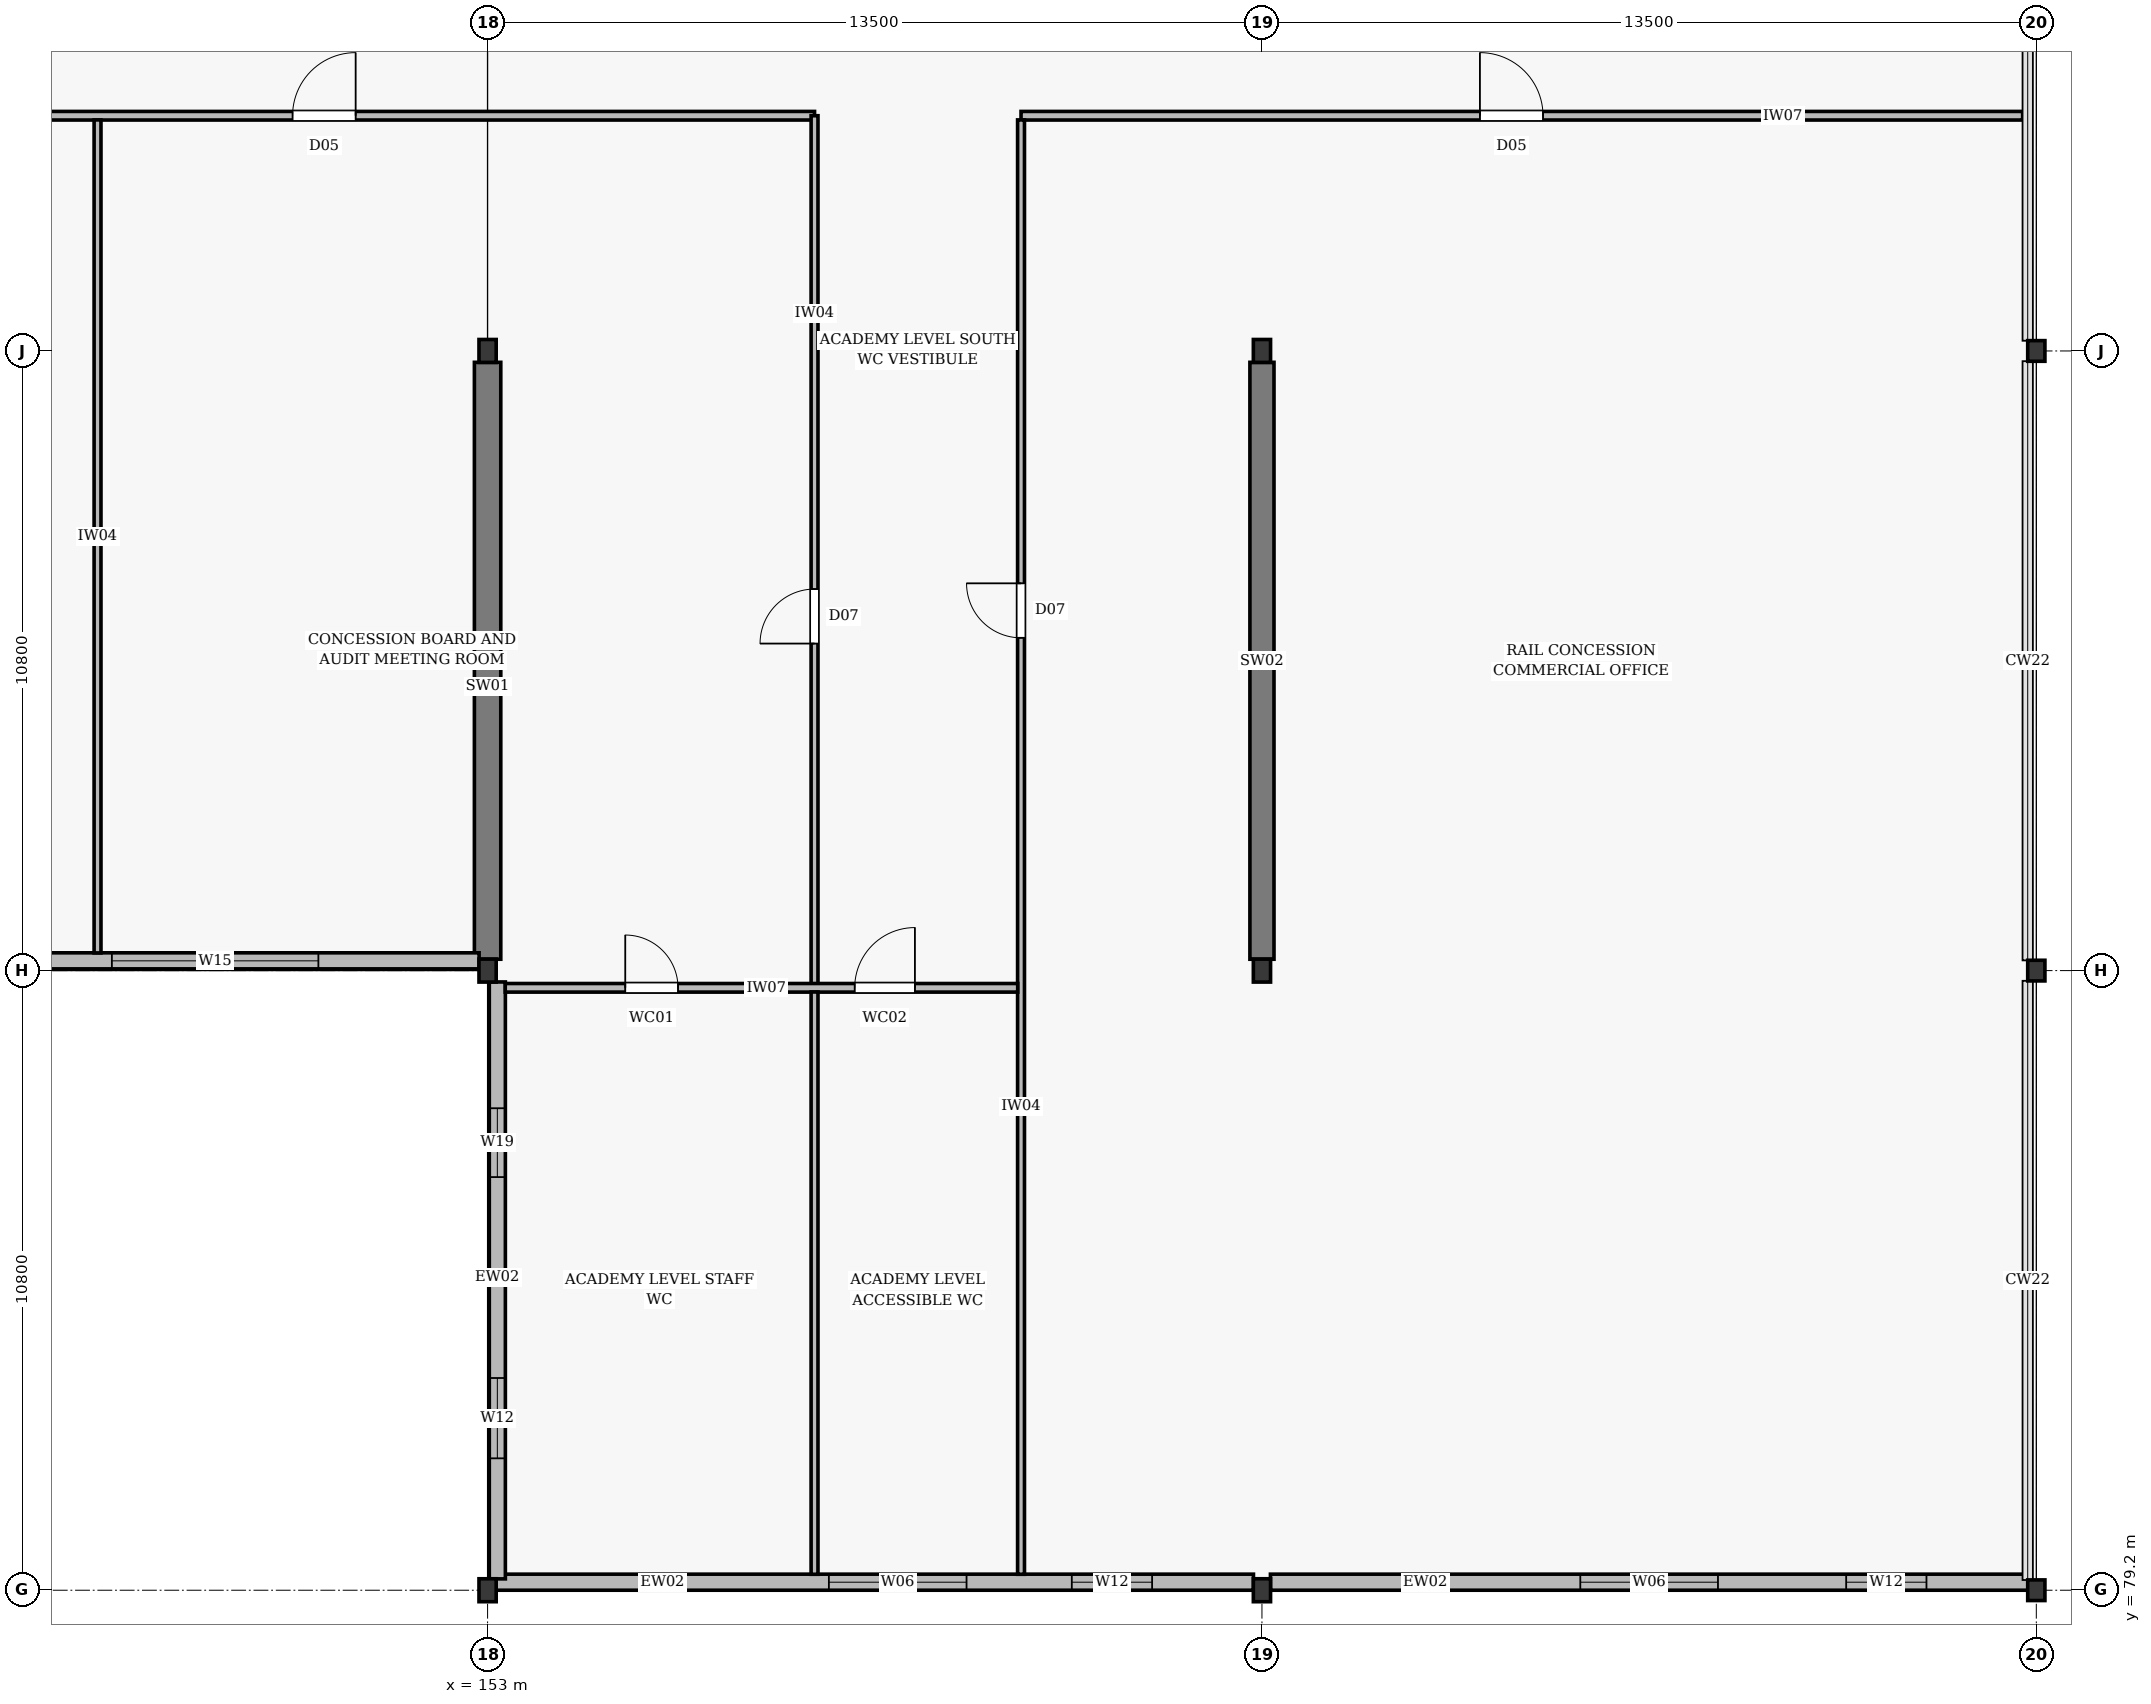
"""IFC4 building model, lengths in metres.
Left out: names, types, materials, properties, quantities, classifications, styles, units other than length and angle.
Written with IfcOpenShell. Run it as: python <this file> out.ifc"""

import sys

from ifc_helpers import new_model, si_unit, direction, frame, frame_2d, origin, origin_2d, place, context, subcontext, project, spatial, rectangle, i_section, extrude, element, fill, save


model = new_model("IFC4")
c1 = context("Model", 3, precision=1e-05, world=origin(), true_north=direction((0.0, 1.0)))
c2 = subcontext(c1, "Body", "Model", "MODEL_VIEW")
j1 = project(units=[si_unit("LENGTHUNIT", "METRE"), si_unit("PLANEANGLEUNIT", "RADIAN")], contexts=[c1])
p1 = place(None, origin())
s1 = spatial("IfcSite", under=j1, at=p1, CompositionType="ELEMENT")
p2 = place(p1, origin())
s2 = spatial("IfcBuilding", under=s1, at=p2, CompositionType="ELEMENT")
p3 = place(p2, frame((0.0, 0.0, 21.3)))
s3 = spatial("IfcBuildingStorey", under=s2, at=p3, CompositionType="ELEMENT", Elevation=21.3)
for number, where, z_axis, x_axis in (
    (1, (153.0, 79.2, 0.0), (0.0, 0.0, 1.0), (1.0, 0.0, 0.0)),
    (2, (153.0, 90.0, 0.0), (0.0, 0.0, 1.0), (1.0, 0.0, 0.0)),
    (3, (153.0, 100.8, 0.0), (0.0, 0.0, 1.0), (1.0, 0.0, 0.0)),
    (4, (166.5, 79.2, 0.0), (0.0, 0.0, 1.0), (1.0, 0.0, 0.0)),
    (5, (166.5, 90.0, 0.0), (0.0, 0.0, 1.0), (1.0, 0.0, 0.0)),
    (6, (166.5, 100.8, 0.0), (0.0, 0.0, 1.0), (1.0, 0.0, 0.0)),
):
    element("IfcColumn", number, at=place(p3, frame(where, z_axis=z_axis, x_axis=x_axis)), inside=s3, PredefinedType="COLUMN", context=c2, shape_type="SweptSolid", body=[
        extrude(i_section(OverallWidth=0.3, OverallDepth=0.4, WebThickness=0.013, FlangeThickness=0.024, at=origin_2d()), origin(), (0.0, 0.0, 1.0), 3.9),
    ])
for number, where, z_axis, x_axis in (
    (7, (180.0, 79.2, 0.0), (0.0, 0.0, 1.0), (1.0, 0.0, 0.0)),
    (8, (180.0, 90.0, 0.0), (0.0, 0.0, 1.0), (1.0, 0.0, 0.0)),
    (9, (180.0, 100.8, 0.0), (0.0, 0.0, 1.0), (1.0, 0.0, 0.0)),
):
    element("IfcColumn", number, at=place(p3, frame(where, z_axis=z_axis, x_axis=x_axis)), inside=s3, PredefinedType="COLUMN", context=c2, shape_type="SweptSolid", body=[
        extrude(i_section(OverallWidth=0.3, OverallDepth=0.36, WebThickness=0.012, FlangeThickness=0.022, at=origin_2d()), origin(), (0.0, 0.0, 1.0), 3.9),
    ])
p4 = place(p3, frame((153.0, 90.198, 0.0), z_axis=(0.0, 0.0, 1.0), x_axis=(0.0, 1.0, 0.0)))
e10 = element("IfcWall", 10, at=p4, inside=s3, PredefinedType="SHEAR", context=c2, shape_type="SweptSolid", body=[
    extrude(rectangle(XDim=10.404, YDim=0.46, at=frame_2d((5.202, 0.0))), origin(), (0.0, 0.0, 1.0), 3.68),
])
p5 = place(p3, frame((166.5, 90.198, 0.0), z_axis=(0.0, 0.0, 1.0), x_axis=(0.0, 1.0, 0.0)))
e11 = element("IfcWall", 11, at=p5, inside=s3, PredefinedType="SHEAR", context=c2, shape_type="SweptSolid", body=[
    extrude(rectangle(XDim=10.404, YDim=0.42, at=frame_2d((5.202, 0.0))), origin(), (0.0, 0.0, 1.0), 3.68),
])
p6 = place(p3, frame((153.148, 79.34, 0.0), z_axis=(0.0, 0.0, 1.0), x_axis=(1.0, 0.0, 0.0)))
e12 = element("IfcWall", 12, at=p6, inside=s3, PredefinedType="STANDARD", context=c2, shape_type="SweptSolid", body=[
    extrude(rectangle(XDim=13.204, YDim=0.28, at=frame_2d((6.602, 0.0))), origin(), (0.0, 0.0, 1.0), 3.12),
])
p7 = place(p6, frame((5.802, 0.0, 0.48)))
e13 = element("IfcOpeningElement", 13, at=p7, cuts=e12, PredefinedType="OPENING", context=c2, shape_type="SweptSolid", body=[
    extrude(rectangle(XDim=2.4, YDim=2.4, at=frame_2d((1.2, 1.2))), frame((0.0, 0.152, 0.0), z_axis=(0.0, -1.0, 0.0), x_axis=(1.0, 0.0, 0.0)), (0.0, 0.0, 1.0), 0.304),
])
p8 = place(p6, frame((10.037, 0.0, 1.05)))
e14 = element("IfcOpeningElement", 14, at=p8, cuts=e12, PredefinedType="OPENING", context=c2, shape_type="SweptSolid", body=[
    extrude(rectangle(XDim=1.4, YDim=1.8, at=frame_2d((0.7, 0.9))), frame((0.0, 0.152, 0.0), z_axis=(0.0, -1.0, 0.0), x_axis=(1.0, 0.0, 0.0)), (0.0, 0.0, 1.0), 0.304),
])
p9 = place(p3, frame((166.648, 79.34, 0.0), z_axis=(0.0, 0.0, 1.0), x_axis=(1.0, 0.0, 0.0)))
e15 = element("IfcWall", 15, at=p9, inside=s3, PredefinedType="STANDARD", context=c2, shape_type="SweptSolid", body=[
    extrude(rectangle(XDim=13.204, YDim=0.28, at=frame_2d((6.602, 0.0))), origin(), (0.0, 0.0, 1.0), 3.12),
])
p10 = place(p9, frame((5.402, 0.0, 0.48)))
e16 = element("IfcOpeningElement", 16, at=p10, cuts=e15, PredefinedType="OPENING", context=c2, shape_type="SweptSolid", body=[
    extrude(rectangle(XDim=2.4, YDim=2.4, at=frame_2d((1.2, 1.2))), frame((0.0, 0.152, 0.0), z_axis=(0.0, -1.0, 0.0), x_axis=(1.0, 0.0, 0.0)), (0.0, 0.0, 1.0), 0.304),
])
p11 = place(p9, frame((10.037, 0.0, 1.05)))
e17 = element("IfcOpeningElement", 17, at=p11, cuts=e15, PredefinedType="OPENING", context=c2, shape_type="SweptSolid", body=[
    extrude(rectangle(XDim=1.4, YDim=1.8, at=frame_2d((0.7, 0.9))), frame((0.0, 0.152, 0.0), z_axis=(0.0, -1.0, 0.0), x_axis=(1.0, 0.0, 0.0)), (0.0, 0.0, 1.0), 0.304),
])
p12 = place(p3, frame((140.148, 90.17, 0.0), z_axis=(0.0, 0.0, 1.0), x_axis=(1.0, 0.0, 0.0)))
e18 = element("IfcWall", 18, at=p12, inside=s3, PredefinedType="STANDARD", context=c2, shape_type="SweptSolid", body=[
    extrude(rectangle(XDim=12.704, YDim=0.28, at=frame_2d((6.352, 0.0))), origin(), (0.0, 0.0, 1.0), 3.12),
])
p13 = place(p12, frame((6.302, 0.0, 1.05)))
e19 = element("IfcOpeningElement", 19, at=p13, cuts=e18, PredefinedType="OPENING", context=c2, shape_type="SweptSolid", body=[
    extrude(rectangle(XDim=3.6, YDim=1.4, at=frame_2d((1.8, 0.7))), frame((0.0, 0.152, 0.0), z_axis=(0.0, -1.0, 0.0), x_axis=(1.0, 0.0, 0.0)), (0.0, 0.0, 1.0), 0.304),
])
p14 = place(p3, frame((153.17, 79.398, 0.0), z_axis=(0.0, 0.0, 1.0), x_axis=(0.0, 1.0, 0.0)))
e20 = element("IfcWall", 20, at=p14, inside=s3, PredefinedType="STANDARD", context=c2, shape_type="SweptSolid", body=[
    extrude(rectangle(XDim=10.404, YDim=0.28, at=frame_2d((5.202, 0.0))), origin(), (0.0, 0.0, 1.0), 3.12),
])
p15 = place(p14, frame((2.101, 0.0, 1.05)))
e21 = element("IfcOpeningElement", 21, at=p15, cuts=e20, PredefinedType="OPENING", context=c2, shape_type="SweptSolid", body=[
    extrude(rectangle(XDim=1.4, YDim=1.8, at=frame_2d((0.7, 0.9))), frame((0.0, 0.152, 0.0), z_axis=(0.0, -1.0, 0.0), x_axis=(1.0, 0.0, 0.0)), (0.0, 0.0, 1.0), 0.304),
])
p16 = place(p14, frame((7.003, 0.0, 1.05)))
e22 = element("IfcOpeningElement", 22, at=p16, cuts=e20, PredefinedType="OPENING", context=c2, shape_type="SweptSolid", body=[
    extrude(rectangle(XDim=1.2, YDim=0.9, at=frame_2d((0.6, 0.45))), frame((0.0, 0.152, 0.0), z_axis=(0.0, -1.0, 0.0), x_axis=(1.0, 0.0, 0.0)), (0.0, 0.0, 1.0), 0.304),
])
p17 = place(p3, frame((128.288, 104.9, 0.0), z_axis=(0.0, 0.0, 1.0), x_axis=(1.0, 0.0, 0.0)))
e23 = element("IfcWall", 23, at=p17, inside=s3, PredefinedType="PARTITIONING", context=c2, shape_type="SweptSolid", body=[
    extrude(rectangle(XDim=30.412, YDim=0.15, at=frame_2d((15.206, 0.0))), origin(), (0.0, 0.0, 1.0), 3.33),
])
p18 = place(p17, frame((7.312, 0.0, 0.005)))
e24 = element("IfcOpeningElement", 24, at=p18, cuts=e23, PredefinedType="OPENING", context=c2, shape_type="SweptSolid", body=[
    extrude(rectangle(XDim=1.65, YDim=2.2, at=frame_2d((0.825, 1.1))), frame((0.0, 0.087, 0.0), z_axis=(0.0, -1.0, 0.0), x_axis=(1.0, 0.0, 0.0)), (0.0, 0.0, 1.0), 0.174),
])
p19 = place(p17, frame((21.312, 0.0, 0.005)))
e25 = element("IfcOpeningElement", 25, at=p19, cuts=e23, PredefinedType="OPENING", context=c2, shape_type="SweptSolid", body=[
    extrude(rectangle(XDim=1.1, YDim=2.1, at=frame_2d((0.55, 1.05))), frame((0.0, 0.087, 0.0), z_axis=(0.0, -1.0, 0.0), x_axis=(1.0, 0.0, 0.0)), (0.0, 0.0, 1.0), 0.174),
])
p20 = place(p3, frame((162.3, 104.9, 0.0), z_axis=(0.0, 0.0, 1.0), x_axis=(1.0, 0.0, 0.0)))
e26 = element("IfcWall", 26, at=p20, inside=s3, PredefinedType="PARTITIONING", context=c2, shape_type="SweptSolid", body=[
    extrude(rectangle(XDim=17.462, YDim=0.15, at=frame_2d((8.731, 0.0))), origin(), (0.0, 0.0, 1.0), 3.31),
])
p21 = place(p20, frame((8.0, 0.0, 0.005)))
e27 = element("IfcOpeningElement", 27, at=p21, cuts=e26, PredefinedType="OPENING", context=c2, shape_type="SweptSolid", body=[
    extrude(rectangle(XDim=1.1, YDim=2.1, at=frame_2d((0.55, 1.05))), frame((0.0, 0.087, 0.0), z_axis=(0.0, -1.0, 0.0), x_axis=(1.0, 0.0, 0.0)), (0.0, 0.0, 1.0), 0.174),
])
p22 = place(p3, frame((158.7, 89.7, 0.0), z_axis=(0.0, 0.0, 1.0), x_axis=(0.0, 1.0, 0.0)))
e28 = element("IfcWall", 28, at=p22, inside=s3, PredefinedType="PARTITIONING", context=c2, shape_type="SweptSolid", body=[
    extrude(rectangle(XDim=15.2, YDim=0.12, at=frame_2d((7.6, 0.0))), origin(), (0.0, 0.0, 1.0), 3.12),
])
p23 = place(p22, frame((6.0, 0.0, 0.005)))
e29 = element("IfcOpeningElement", 29, at=p23, cuts=e28, PredefinedType="OPENING", context=c2, shape_type="SweptSolid", body=[
    extrude(rectangle(XDim=0.95, YDim=2.1, at=frame_2d((0.475, 1.05))), frame((0.0, 0.072, 0.0), z_axis=(0.0, -1.0, 0.0), x_axis=(1.0, 0.0, 0.0)), (0.0, 0.0, 1.0), 0.144),
])
p24 = place(p3, frame((162.3, 79.478, 0.0), z_axis=(0.0, 0.0, 1.0), x_axis=(0.0, 1.0, 0.0)))
e30 = element("IfcWall", 30, at=p24, inside=s3, PredefinedType="PARTITIONING", context=c2, shape_type="SweptSolid", body=[
    extrude(rectangle(XDim=25.349, YDim=0.12, at=frame_2d((12.674, 0.0))), origin(), (0.0, 0.0, 1.0), 3.12),
])
p25 = place(p24, frame((16.322, 0.0, 0.005)))
e31 = element("IfcOpeningElement", 31, at=p25, cuts=e30, PredefinedType="OPENING", context=c2, shape_type="SweptSolid", body=[
    extrude(rectangle(XDim=0.95, YDim=2.1, at=frame_2d((0.475, 1.05))), frame((0.0, 0.072, 0.0), z_axis=(0.0, -1.0, 0.0), x_axis=(1.0, 0.0, 0.0)), (0.0, 0.0, 1.0), 0.144),
])
p26 = place(p3, frame((146.2, 90.308, 0.0), z_axis=(0.0, 0.0, 1.0), x_axis=(0.0, 1.0, 0.0)))
e32 = element("IfcWall", 32, at=p26, inside=s3, PredefinedType="PARTITIONING", context=c2, shape_type="SweptSolid", body=[
    extrude(rectangle(XDim=14.519, YDim=0.12, at=frame_2d((7.259, 0.0))), origin(), (0.0, 0.0, 1.0), 3.12),
])
p27 = place(p3, frame((153.308, 89.7, 0.0), z_axis=(0.0, 0.0, 1.0), x_axis=(1.0, 0.0, 0.0)))
e33 = element("IfcWall", 33, at=p27, inside=s3, PredefinedType="PARTITIONING", context=c2, shape_type="SweptSolid", body=[
    extrude(rectangle(XDim=8.934, YDim=0.15, at=frame_2d((4.467, 0.0))), origin(), (0.0, 0.0, 1.0), 3.12),
])
p28 = place(p27, frame((2.092, 0.0, 0.005)))
e34 = element("IfcOpeningElement", 34, at=p28, cuts=e33, PredefinedType="OPENING", context=c2, shape_type="SweptSolid", body=[
    extrude(rectangle(XDim=0.92, YDim=2.12, at=frame_2d((0.46, 1.06))), frame((0.0, 0.087, 0.0), z_axis=(0.0, -1.0, 0.0), x_axis=(1.0, 0.0, 0.0)), (0.0, 0.0, 1.0), 0.174),
])
p29 = place(p27, frame((6.092, 0.0, 0.005)))
e35 = element("IfcOpeningElement", 35, at=p29, cuts=e33, PredefinedType="OPENING", context=c2, shape_type="SweptSolid", body=[
    extrude(rectangle(XDim=1.05, YDim=2.15, at=frame_2d((0.525, 1.075))), frame((0.0, 0.087, 0.0), z_axis=(0.0, -1.0, 0.0), x_axis=(1.0, 0.0, 0.0)), (0.0, 0.0, 1.0), 0.174),
])
p30 = place(p3, frame((158.7, 79.478, 0.0), z_axis=(0.0, 0.0, 1.0), x_axis=(0.0, 1.0, 0.0)))
e36 = element("IfcWall", 36, at=p30, inside=s3, PredefinedType="PARTITIONING", context=c2, shape_type="SweptSolid", body=[
    extrude(rectangle(XDim=10.149, YDim=0.12, at=frame_2d((5.074, 0.0))), origin(), (0.0, 0.0, 1.0), 3.12),
])
p31 = place(p7, origin())
e37 = element("IfcWindow", 37, at=p31, inside=s3, PartitioningType="DOUBLE_PANEL_VERTICAL", PredefinedType="WINDOW", context=c2, shape_type="SweptSolid", body=[
    extrude(rectangle(XDim=2.4, YDim=2.4, at=frame_2d((1.2, 1.2))), frame((0.0, 0.03, 0.0), z_axis=(0.0, -1.0, 0.0), x_axis=(1.0, 0.0, 0.0)), (0.0, 0.0, 1.0), 0.06),
])
fill(e13, e37)
p32 = place(p8, origin())
e38 = element("IfcWindow", 38, at=p32, inside=s3, PartitioningType="DOUBLE_PANEL_VERTICAL", PredefinedType="WINDOW", context=c2, shape_type="SweptSolid", body=[
    extrude(rectangle(XDim=1.4, YDim=1.8, at=frame_2d((0.7, 0.9))), frame((0.0, 0.03, 0.0), z_axis=(0.0, -1.0, 0.0), x_axis=(1.0, 0.0, 0.0)), (0.0, 0.0, 1.0), 0.06),
])
fill(e14, e38)
p33 = place(p10, origin())
e39 = element("IfcWindow", 39, at=p33, inside=s3, PartitioningType="DOUBLE_PANEL_VERTICAL", PredefinedType="WINDOW", context=c2, shape_type="SweptSolid", body=[
    extrude(rectangle(XDim=2.4, YDim=2.4, at=frame_2d((1.2, 1.2))), frame((0.0, 0.03, 0.0), z_axis=(0.0, -1.0, 0.0), x_axis=(1.0, 0.0, 0.0)), (0.0, 0.0, 1.0), 0.06),
])
fill(e16, e39)
p34 = place(p11, origin())
e40 = element("IfcWindow", 40, at=p34, inside=s3, PartitioningType="DOUBLE_PANEL_VERTICAL", PredefinedType="WINDOW", context=c2, shape_type="SweptSolid", body=[
    extrude(rectangle(XDim=1.4, YDim=1.8, at=frame_2d((0.7, 0.9))), frame((0.0, 0.03, 0.0), z_axis=(0.0, -1.0, 0.0), x_axis=(1.0, 0.0, 0.0)), (0.0, 0.0, 1.0), 0.06),
])
fill(e17, e40)
p35 = place(p13, origin())
e41 = element("IfcWindow", 41, at=p35, inside=s3, PartitioningType="DOUBLE_PANEL_VERTICAL", PredefinedType="WINDOW", context=c2, shape_type="SweptSolid", body=[
    extrude(rectangle(XDim=3.6, YDim=1.4, at=frame_2d((1.8, 0.7))), frame((0.0, 0.03, 0.0), z_axis=(0.0, -1.0, 0.0), x_axis=(1.0, 0.0, 0.0)), (0.0, 0.0, 1.0), 0.06),
])
fill(e19, e41)
p36 = place(p15, origin())
e42 = element("IfcWindow", 42, at=p36, inside=s3, PartitioningType="DOUBLE_PANEL_VERTICAL", PredefinedType="WINDOW", context=c2, shape_type="SweptSolid", body=[
    extrude(rectangle(XDim=1.4, YDim=1.8, at=frame_2d((0.7, 0.9))), frame((0.0, 0.03, 0.0), z_axis=(0.0, -1.0, 0.0), x_axis=(1.0, 0.0, 0.0)), (0.0, 0.0, 1.0), 0.06),
])
fill(e21, e42)
p37 = place(p16, origin())
e43 = element("IfcWindow", 43, at=p37, inside=s3, PartitioningType="DOUBLE_PANEL_VERTICAL", PredefinedType="WINDOW", context=c2, shape_type="SweptSolid", body=[
    extrude(rectangle(XDim=1.2, YDim=0.9, at=frame_2d((0.6, 0.45))), frame((0.0, 0.03, 0.0), z_axis=(0.0, -1.0, 0.0), x_axis=(1.0, 0.0, 0.0)), (0.0, 0.0, 1.0), 0.06),
])
fill(e22, e43)
p38 = place(p19, origin())
e44 = element("IfcDoor", 44, at=p38, inside=s3, OperationType="SINGLE_SWING_RIGHT", PredefinedType="DOOR", context=c2, shape_type="SweptSolid", body=[
    extrude(rectangle(XDim=1.1, YDim=2.1, at=frame_2d((0.55, 1.05))), frame((0.0, 0.025, 0.0), z_axis=(0.0, -1.0, 0.0), x_axis=(1.0, 0.0, 0.0)), (0.0, 0.0, 1.0), 0.05),
])
fill(e25, e44)
p39 = place(p21, origin())
e45 = element("IfcDoor", 45, at=p39, inside=s3, OperationType="SINGLE_SWING_LEFT", PredefinedType="DOOR", context=c2, shape_type="SweptSolid", body=[
    extrude(rectangle(XDim=1.1, YDim=2.1, at=frame_2d((0.55, 1.05))), frame((0.0, 0.025, 0.0), z_axis=(0.0, -1.0, 0.0), x_axis=(1.0, 0.0, 0.0)), (0.0, 0.0, 1.0), 0.05),
])
fill(e27, e45)
p40 = place(p23, origin())
e46 = element("IfcDoor", 46, at=p40, inside=s3, OperationType="SINGLE_SWING_LEFT", PredefinedType="DOOR", context=c2, shape_type="SweptSolid", body=[
    extrude(rectangle(XDim=0.95, YDim=2.1, at=frame_2d((0.475, 1.05))), frame((0.0, 0.025, 0.0), z_axis=(0.0, -1.0, 0.0), x_axis=(1.0, 0.0, 0.0)), (0.0, 0.0, 1.0), 0.05),
])
fill(e29, e46)
p41 = place(p25, origin())
e47 = element("IfcDoor", 47, at=p41, inside=s3, OperationType="SINGLE_SWING_RIGHT", PredefinedType="DOOR", context=c2, shape_type="SweptSolid", body=[
    extrude(rectangle(XDim=0.95, YDim=2.1, at=frame_2d((0.475, 1.05))), frame((0.0, 0.025, 0.0), z_axis=(0.0, -1.0, 0.0), x_axis=(1.0, 0.0, 0.0)), (0.0, 0.0, 1.0), 0.05),
])
fill(e31, e47)
p42 = place(p28, origin())
e48 = element("IfcDoor", 48, at=p42, inside=s3, OperationType="SINGLE_SWING_LEFT", PredefinedType="DOOR", context=c2, shape_type="SweptSolid", body=[
    extrude(rectangle(XDim=0.92, YDim=2.12, at=frame_2d((0.46, 1.06))), frame((0.0, 0.025, 0.0), z_axis=(0.0, -1.0, 0.0), x_axis=(1.0, 0.0, 0.0)), (0.0, 0.0, 1.0), 0.05),
])
fill(e34, e48)
p43 = place(p29, origin())
e49 = element("IfcDoor", 49, at=p43, inside=s3, OperationType="SINGLE_SWING_RIGHT", PredefinedType="DOOR", context=c2, shape_type="SweptSolid", body=[
    extrude(rectangle(XDim=1.05, YDim=2.15, at=frame_2d((0.525, 1.075))), frame((0.0, 0.025, 0.0), z_axis=(0.0, -1.0, 0.0), x_axis=(1.0, 0.0, 0.0)), (0.0, 0.0, 1.0), 0.05),
])
fill(e35, e49)
save(model, sys.argv[1])
